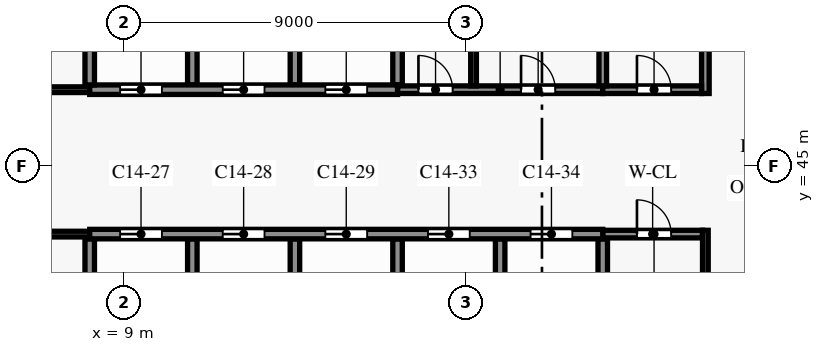
"""IFC4 building model, lengths in metres.
Left out: names, types, materials, properties, quantities, classifications, styles, units other than length and angle.
Written with IfcOpenShell. Run it as: python <this file> out.ifc"""

import sys

from ifc_helpers import new_model, si_unit, direction, frame, frame_2d, origin, place, context, subcontext, project, spatial, rectangle, extrude, element, fill, save


model = new_model("IFC4")
c1 = context("Model", 3, precision=1e-05, world=origin(), true_north=direction((0.0, 1.0)))
c2 = subcontext(c1, "Body", "Model", "MODEL_VIEW")
j1 = project(units=[si_unit("LENGTHUNIT", "METRE"), si_unit("PLANEANGLEUNIT", "RADIAN")], contexts=[c1])
p1 = place(None, origin())
s1 = spatial("IfcSite", under=j1, at=p1, CompositionType="ELEMENT")
p2 = place(p1, origin())
s2 = spatial("IfcBuilding", under=s1, at=p2, CompositionType="ELEMENT")
p3 = place(p2, frame((0.0, 0.0, 88.5)))
s3 = spatial("IfcBuildingStorey", under=s2, at=p3, CompositionType="ELEMENT", Elevation=88.5)
p4 = place(p3, frame((21.6, 43.2, 0.0), z_axis=(0.0, 0.0, 1.0), x_axis=(1.0, 0.0, 0.0)))
e1 = element("IfcWall", 1, at=p4, inside=s3, PredefinedType="PARTITIONING", context=c2, shape_type="SweptSolid", body=[
    extrude(rectangle(XDim=2.625, YDim=0.2, at=frame_2d((1.312, 0.0))), origin(), (0.0, 0.0, 1.0), 3.5),
])
p5 = place(p4, frame((0.9, 0.0, 0.0)))
e2 = element("IfcOpeningElement", 2, at=p5, cuts=e1, PredefinedType="OPENING", context=c2, shape_type="SweptSolid", body=[
    extrude(rectangle(XDim=0.9, YDim=2.1, at=frame_2d((0.45, 1.05))), frame((0.0, 0.11, 0.0), z_axis=(0.0, -1.0, 0.0), x_axis=(1.0, 0.0, 0.0)), (0.0, 0.0, 1.0), 0.22),
])
p6 = place(p3, frame((0.15, 43.2, 0.0), z_axis=(0.0, 0.0, 1.0), x_axis=(1.0, 0.0, 0.0)))
e3 = element("IfcWall", 3, at=p6, inside=s3, PredefinedType="PARTITIONING", context=c2, shape_type="SweptSolid", body=[
    extrude(rectangle(XDim=7.95, YDim=0.15, at=frame_2d((3.975, 0.0))), origin(), (0.0, 0.0, 1.0), 3.5),
])
p7 = place(p6, frame((0.725, 0.0, 0.0)))
e4 = element("IfcOpeningElement", 4, at=p7, cuts=e3, PredefinedType="OPENING", context=c2, shape_type="SweptSolid", body=[
    extrude(rectangle(XDim=0.9, YDim=2.1, at=frame_2d((0.45, 1.05))), frame((0.0, 0.085, 0.0), z_axis=(0.0, -1.0, 0.0), x_axis=(1.0, 0.0, 0.0)), (0.0, 0.0, 1.0), 0.17),
])
p8 = place(p6, frame((4.45, 0.0, 0.0)))
e5 = element("IfcOpeningElement", 5, at=p8, cuts=e3, PredefinedType="OPENING", context=c2, shape_type="SweptSolid", body=[
    extrude(rectangle(XDim=0.9, YDim=2.1, at=frame_2d((0.45, 1.05))), frame((0.0, 0.085, 0.0), z_axis=(0.0, -1.0, 0.0), x_axis=(1.0, 0.0, 0.0)), (0.0, 0.0, 1.0), 0.17),
])
p9 = place(p3, frame((8.1, 43.2, 0.0), z_axis=(0.0, 0.0, 1.0), x_axis=(1.0, 0.0, 0.0)))
e6 = element("IfcWall", 6, at=p9, inside=s3, PredefinedType="SHEAR", context=c2, shape_type="SweptSolid", body=[
    extrude(rectangle(XDim=13.5, YDim=0.25, at=frame_2d((6.75, 0.0))), origin(), (0.0, 0.0, 1.0), 3.5),
])
p10 = place(p9, frame((0.8, 0.0, 0.0)))
e7 = element("IfcOpeningElement", 7, at=p10, cuts=e6, PredefinedType="OPENING", context=c2, shape_type="SweptSolid", body=[
    extrude(rectangle(XDim=1.1, YDim=2.1, at=frame_2d((0.55, 1.05))), frame((0.0, 0.135, 0.0), z_axis=(0.0, -1.0, 0.0), x_axis=(1.0, 0.0, 0.0)), (0.0, 0.0, 1.0), 0.27),
])
p11 = place(p9, frame((3.5, 0.0, 0.0)))
e8 = element("IfcOpeningElement", 8, at=p11, cuts=e6, PredefinedType="OPENING", context=c2, shape_type="SweptSolid", body=[
    extrude(rectangle(XDim=1.1, YDim=2.1, at=frame_2d((0.55, 1.05))), frame((0.0, 0.135, 0.0), z_axis=(0.0, -1.0, 0.0), x_axis=(1.0, 0.0, 0.0)), (0.0, 0.0, 1.0), 0.27),
])
p12 = place(p9, frame((6.2, 0.0, 0.0)))
e9 = element("IfcOpeningElement", 9, at=p12, cuts=e6, PredefinedType="OPENING", context=c2, shape_type="SweptSolid", body=[
    extrude(rectangle(XDim=1.1, YDim=2.1, at=frame_2d((0.55, 1.05))), frame((0.0, 0.135, 0.0), z_axis=(0.0, -1.0, 0.0), x_axis=(1.0, 0.0, 0.0)), (0.0, 0.0, 1.0), 0.27),
])
p13 = place(p9, frame((8.9, 0.0, 0.0)))
e10 = element("IfcOpeningElement", 10, at=p13, cuts=e6, PredefinedType="OPENING", context=c2, shape_type="SweptSolid", body=[
    extrude(rectangle(XDim=1.1, YDim=2.1, at=frame_2d((0.55, 1.05))), frame((0.0, 0.135, 0.0), z_axis=(0.0, -1.0, 0.0), x_axis=(1.0, 0.0, 0.0)), (0.0, 0.0, 1.0), 0.27),
])
p14 = place(p9, frame((11.6, 0.0, 0.0)))
e11 = element("IfcOpeningElement", 11, at=p14, cuts=e6, PredefinedType="OPENING", context=c2, shape_type="SweptSolid", body=[
    extrude(rectangle(XDim=1.1, YDim=2.1, at=frame_2d((0.55, 1.05))), frame((0.0, 0.135, 0.0), z_axis=(0.0, -1.0, 0.0), x_axis=(1.0, 0.0, 0.0)), (0.0, 0.0, 1.0), 0.27),
])
p15 = place(p3, frame((16.2, 47.0, 0.0), z_axis=(0.0, 0.0, 1.0), x_axis=(1.0, 0.0, 0.0)))
e12 = element("IfcWall", 12, at=p15, inside=s3, PredefinedType="PARTITIONING", context=c2, shape_type="SweptSolid", body=[
    extrude(rectangle(XDim=5.4, YDim=0.2, at=frame_2d((2.7, 0.0))), origin(), (0.0, 0.0, 1.0), 3.5),
])
p16 = place(p15, frame((0.55, 0.0, 0.0)))
e13 = element("IfcOpeningElement", 13, at=p16, cuts=e12, PredefinedType="OPENING", context=c2, shape_type="SweptSolid", body=[
    extrude(rectangle(XDim=0.9, YDim=2.1, at=frame_2d((0.45, 1.05))), frame((0.0, 0.11, 0.0), z_axis=(0.0, -1.0, 0.0), x_axis=(1.0, 0.0, 0.0)), (0.0, 0.0, 1.0), 0.22),
])
p17 = place(p15, frame((3.25, 0.0, 0.0)))
e14 = element("IfcOpeningElement", 14, at=p17, cuts=e12, PredefinedType="OPENING", context=c2, shape_type="SweptSolid", body=[
    extrude(rectangle(XDim=0.9, YDim=2.1, at=frame_2d((0.45, 1.05))), frame((0.0, 0.11, 0.0), z_axis=(0.0, -1.0, 0.0), x_axis=(1.0, 0.0, 0.0)), (0.0, 0.0, 1.0), 0.22),
])
p18 = place(p3, frame((0.15, 47.0, 0.0), z_axis=(0.0, 0.0, 1.0), x_axis=(1.0, 0.0, 0.0)))
e15 = element("IfcWall", 15, at=p18, inside=s3, PredefinedType="PARTITIONING", context=c2, shape_type="SweptSolid", body=[
    extrude(rectangle(XDim=7.95, YDim=0.15, at=frame_2d((3.975, 0.0))), origin(), (0.0, 0.0, 1.0), 3.5),
])
p19 = place(p18, frame((0.725, 0.0, 0.0)))
e16 = element("IfcOpeningElement", 16, at=p19, cuts=e15, PredefinedType="OPENING", context=c2, shape_type="SweptSolid", body=[
    extrude(rectangle(XDim=0.9, YDim=2.1, at=frame_2d((0.45, 1.05))), frame((0.0, 0.085, 0.0), z_axis=(0.0, -1.0, 0.0), x_axis=(1.0, 0.0, 0.0)), (0.0, 0.0, 1.0), 0.17),
])
p20 = place(p18, frame((4.45, 0.0, 0.0)))
e17 = element("IfcOpeningElement", 17, at=p20, cuts=e15, PredefinedType="OPENING", context=c2, shape_type="SweptSolid", body=[
    extrude(rectangle(XDim=0.9, YDim=2.1, at=frame_2d((0.45, 1.05))), frame((0.0, 0.085, 0.0), z_axis=(0.0, -1.0, 0.0), x_axis=(1.0, 0.0, 0.0)), (0.0, 0.0, 1.0), 0.17),
])
p21 = place(p3, frame((21.6, 47.0, 0.0), z_axis=(0.0, 0.0, 1.0), x_axis=(1.0, 0.0, 0.0)))
e18 = element("IfcWall", 18, at=p21, inside=s3, PredefinedType="PARTITIONING", context=c2, shape_type="SweptSolid", body=[
    extrude(rectangle(XDim=2.6, YDim=0.2, at=frame_2d((1.3, 0.0))), origin(), (0.0, 0.0, 1.0), 3.5),
])
p22 = place(p21, frame((0.9, 0.0, 0.0)))
e19 = element("IfcOpeningElement", 19, at=p22, cuts=e18, PredefinedType="OPENING", context=c2, shape_type="SweptSolid", body=[
    extrude(rectangle(XDim=0.9, YDim=2.1, at=frame_2d((0.45, 1.05))), frame((0.0, 0.11, 0.0), z_axis=(0.0, -1.0, 0.0), x_axis=(1.0, 0.0, 0.0)), (0.0, 0.0, 1.0), 0.22),
])
p23 = place(p3, frame((8.1, 47.0, 0.0), z_axis=(0.0, 0.0, 1.0), x_axis=(1.0, 0.0, 0.0)))
e20 = element("IfcWall", 20, at=p23, inside=s3, PredefinedType="SHEAR", context=c2, shape_type="SweptSolid", body=[
    extrude(rectangle(XDim=8.1, YDim=0.25, at=frame_2d((4.05, 0.0))), origin(), (0.0, 0.0, 1.0), 3.5),
])
p24 = place(p23, frame((0.8, 0.0, 0.0)))
e21 = element("IfcOpeningElement", 21, at=p24, cuts=e20, PredefinedType="OPENING", context=c2, shape_type="SweptSolid", body=[
    extrude(rectangle(XDim=1.1, YDim=2.1, at=frame_2d((0.55, 1.05))), frame((0.0, 0.135, 0.0), z_axis=(0.0, -1.0, 0.0), x_axis=(1.0, 0.0, 0.0)), (0.0, 0.0, 1.0), 0.27),
])
p25 = place(p23, frame((3.5, 0.0, 0.0)))
e22 = element("IfcOpeningElement", 22, at=p25, cuts=e20, PredefinedType="OPENING", context=c2, shape_type="SweptSolid", body=[
    extrude(rectangle(XDim=1.1, YDim=2.1, at=frame_2d((0.55, 1.05))), frame((0.0, 0.135, 0.0), z_axis=(0.0, -1.0, 0.0), x_axis=(1.0, 0.0, 0.0)), (0.0, 0.0, 1.0), 0.27),
])
p26 = place(p23, frame((6.2, 0.0, 0.0)))
e23 = element("IfcOpeningElement", 23, at=p26, cuts=e20, PredefinedType="OPENING", context=c2, shape_type="SweptSolid", body=[
    extrude(rectangle(XDim=1.1, YDim=2.1, at=frame_2d((0.55, 1.05))), frame((0.0, 0.135, 0.0), z_axis=(0.0, -1.0, 0.0), x_axis=(1.0, 0.0, 0.0)), (0.0, 0.0, 1.0), 0.27),
])
for number, where, z_axis, x_axis in (
    (24, (8.1, 40.125, 0.0), (0.0, 0.0, 1.0), (0.0, 1.0, 0.0)),
    (25, (8.1, 47.125, 0.0), (0.0, 0.0, 1.0), (0.0, 1.0, 0.0)),
    (26, (10.8, 40.125, 0.0), (0.0, 0.0, 1.0), (0.0, 1.0, 0.0)),
    (27, (10.8, 47.125, 0.0), (0.0, 0.0, 1.0), (0.0, 1.0, 0.0)),
    (28, (13.5, 40.125, 0.0), (0.0, 0.0, 1.0), (0.0, 1.0, 0.0)),
    (29, (13.5, 47.125, 0.0), (0.0, 0.0, 1.0), (0.0, 1.0, 0.0)),
    (30, (16.2, 40.125, 0.0), (0.0, 0.0, 1.0), (0.0, 1.0, 0.0)),
):
    element("IfcWall", number, at=place(p3, frame(where, z_axis=z_axis, x_axis=x_axis)), inside=s3, PredefinedType="SHEAR", context=c2, shape_type="SweptSolid", body=[
        extrude(rectangle(XDim=2.95, YDim=0.25, at=frame_2d((1.475, 0.0))), origin(), (0.0, 0.0, 1.0), 3.5),
    ])
p27 = place(p3, frame((16.2, 47.125, 0.0), z_axis=(0.0, 0.0, 1.0), x_axis=(0.0, 1.0, 0.0)))
e31 = element("IfcWall", 31, at=p27, inside=s3, PredefinedType="SHEAR", context=c2, shape_type="SweptSolid", body=[
    extrude(rectangle(XDim=3.075, YDim=0.25, at=frame_2d((1.538, 0.0))), origin(), (0.0, 0.0, 1.0), 3.5),
])
p28 = place(p3, frame((18.2, 47.1, 0.0), z_axis=(0.0, 0.0, 1.0), x_axis=(0.0, 1.0, 0.0)))
e32 = element("IfcWall", 32, at=p28, inside=s3, PredefinedType="PARTITIONING", context=c2, shape_type="SweptSolid", body=[
    extrude(rectangle(XDim=4.625, YDim=0.15, at=frame_2d((2.312, 0.0))), origin(), (0.0, 0.0, 1.0), 3.5),
])
p29 = place(p3, frame((18.9, 40.125, 0.0), z_axis=(0.0, 0.0, 1.0), x_axis=(0.0, 1.0, 0.0)))
e33 = element("IfcWall", 33, at=p29, inside=s3, PredefinedType="SHEAR", context=c2, shape_type="SweptSolid", body=[
    extrude(rectangle(XDim=2.95, YDim=0.25, at=frame_2d((1.475, 0.0))), origin(), (0.0, 0.0, 1.0), 3.5),
])
p30 = place(p3, frame((21.6, 47.1, 0.0), z_axis=(0.0, 0.0, 1.0), x_axis=(0.0, 1.0, 0.0)))
e34 = element("IfcWall", 34, at=p30, inside=s3, PredefinedType="PARTITIONING", context=c2, shape_type="SweptSolid", body=[
    extrude(rectangle(XDim=4.6, YDim=0.2, at=frame_2d((2.3, 0.0))), origin(), (0.0, 0.0, 1.0), 3.5),
])
p31 = place(p3, frame((21.6, 40.125, 0.0), z_axis=(0.0, 0.0, 1.0), x_axis=(0.0, 1.0, 0.0)))
e35 = element("IfcWall", 35, at=p31, inside=s3, PredefinedType="SHEAR", context=c2, shape_type="SweptSolid", body=[
    extrude(rectangle(XDim=2.95, YDim=0.25, at=frame_2d((1.475, 0.0))), origin(), (0.0, 0.0, 1.0), 3.5),
])
p32 = place(p3, frame((24.3, 35.925, 0.0), z_axis=(0.0, 0.0, 1.0), x_axis=(0.0, 1.0, 0.0)))
e36 = element("IfcWall", 36, at=p32, inside=s3, PredefinedType="PARTITIONING", context=c2, shape_type="SweptSolid", body=[
    extrude(rectangle(XDim=7.375, YDim=0.15, at=frame_2d((3.688, 0.0))), origin(), (0.0, 0.0, 1.0), 3.5),
])
p33 = place(p3, frame((24.3, 46.9, 0.0), z_axis=(0.0, 0.0, 1.0), x_axis=(0.0, 1.0, 0.0)))
e37 = element("IfcWall", 37, at=p33, inside=s3, PredefinedType="SHEAR", context=c2, shape_type="SweptSolid", body=[
    extrude(rectangle(XDim=5.0, YDim=0.2, at=frame_2d((2.5, 0.0))), origin(), (0.0, 0.0, 1.0), 3.5),
])
p34 = place(p22, origin())
e38 = element("IfcDoor", 38, at=p34, inside=s3, OperationType="SINGLE_SWING_LEFT", PredefinedType="DOOR", context=c2, shape_type="SweptSolid", body=[
    extrude(rectangle(XDim=0.9, YDim=2.1, at=frame_2d((0.45, 1.05))), frame((0.0, 0.025, 0.0), z_axis=(0.0, -1.0, 0.0), x_axis=(1.0, 0.0, 0.0)), (0.0, 0.0, 1.0), 0.05),
])
fill(e19, e38)
p35 = place(p16, origin())
e39 = element("IfcDoor", 39, at=p35, inside=s3, OperationType="SINGLE_SWING_LEFT", PredefinedType="DOOR", context=c2, shape_type="SweptSolid", body=[
    extrude(rectangle(XDim=0.9, YDim=2.1, at=frame_2d((0.45, 1.05))), frame((0.0, 0.025, 0.0), z_axis=(0.0, -1.0, 0.0), x_axis=(1.0, 0.0, 0.0)), (0.0, 0.0, 1.0), 0.05),
])
fill(e13, e39)
p36 = place(p17, origin())
e40 = element("IfcDoor", 40, at=p36, inside=s3, OperationType="SINGLE_SWING_RIGHT", PredefinedType="DOOR", context=c2, shape_type="SweptSolid", body=[
    extrude(rectangle(XDim=0.9, YDim=2.1, at=frame_2d((0.45, 1.05))), frame((0.0, 0.025, 0.0), z_axis=(0.0, -1.0, 0.0), x_axis=(1.0, 0.0, 0.0)), (0.0, 0.0, 1.0), 0.05),
])
fill(e14, e40)
p37 = place(p5, origin())
e41 = element("IfcDoor", 41, at=p37, inside=s3, OperationType="SINGLE_SWING_RIGHT", PredefinedType="DOOR", context=c2, shape_type="SweptSolid", body=[
    extrude(rectangle(XDim=0.9, YDim=2.1, at=frame_2d((0.45, 1.05))), frame((0.0, 0.025, 0.0), z_axis=(0.0, -1.0, 0.0), x_axis=(1.0, 0.0, 0.0)), (0.0, 0.0, 1.0), 0.05),
])
fill(e2, e41)
p38 = place(p10, origin())
e42 = element("IfcDoor", 42, at=p38, inside=s3, OperationType="DOUBLE_DOOR_SLIDING", PredefinedType="DOOR", context=c2, shape_type="SweptSolid", body=[
    extrude(rectangle(XDim=1.1, YDim=2.1, at=frame_2d((0.55, 1.05))), frame((0.0, 0.025, 0.0), z_axis=(0.0, -1.0, 0.0), x_axis=(1.0, 0.0, 0.0)), (0.0, 0.0, 1.0), 0.05),
])
fill(e7, e42)
p39 = place(p11, origin())
e43 = element("IfcDoor", 43, at=p39, inside=s3, OperationType="DOUBLE_DOOR_SLIDING", PredefinedType="DOOR", context=c2, shape_type="SweptSolid", body=[
    extrude(rectangle(XDim=1.1, YDim=2.1, at=frame_2d((0.55, 1.05))), frame((0.0, 0.025, 0.0), z_axis=(0.0, -1.0, 0.0), x_axis=(1.0, 0.0, 0.0)), (0.0, 0.0, 1.0), 0.05),
])
fill(e8, e43)
p40 = place(p12, origin())
e44 = element("IfcDoor", 44, at=p40, inside=s3, OperationType="DOUBLE_DOOR_SLIDING", PredefinedType="DOOR", context=c2, shape_type="SweptSolid", body=[
    extrude(rectangle(XDim=1.1, YDim=2.1, at=frame_2d((0.55, 1.05))), frame((0.0, 0.025, 0.0), z_axis=(0.0, -1.0, 0.0), x_axis=(1.0, 0.0, 0.0)), (0.0, 0.0, 1.0), 0.05),
])
fill(e9, e44)
p41 = place(p24, origin())
e45 = element("IfcDoor", 45, at=p41, inside=s3, OperationType="DOUBLE_DOOR_SLIDING", PredefinedType="DOOR", context=c2, shape_type="SweptSolid", body=[
    extrude(rectangle(XDim=1.1, YDim=2.1, at=frame_2d((0.55, 1.05))), frame((0.0, 0.025, 0.0), z_axis=(0.0, -1.0, 0.0), x_axis=(1.0, 0.0, 0.0)), (0.0, 0.0, 1.0), 0.05),
])
fill(e21, e45)
p42 = place(p25, origin())
e46 = element("IfcDoor", 46, at=p42, inside=s3, OperationType="DOUBLE_DOOR_SLIDING", PredefinedType="DOOR", context=c2, shape_type="SweptSolid", body=[
    extrude(rectangle(XDim=1.1, YDim=2.1, at=frame_2d((0.55, 1.05))), frame((0.0, 0.025, 0.0), z_axis=(0.0, -1.0, 0.0), x_axis=(1.0, 0.0, 0.0)), (0.0, 0.0, 1.0), 0.05),
])
fill(e22, e46)
p43 = place(p26, origin())
e47 = element("IfcDoor", 47, at=p43, inside=s3, OperationType="DOUBLE_DOOR_SLIDING", PredefinedType="DOOR", context=c2, shape_type="SweptSolid", body=[
    extrude(rectangle(XDim=1.1, YDim=2.1, at=frame_2d((0.55, 1.05))), frame((0.0, 0.025, 0.0), z_axis=(0.0, -1.0, 0.0), x_axis=(1.0, 0.0, 0.0)), (0.0, 0.0, 1.0), 0.05),
])
fill(e23, e47)
p44 = place(p13, origin())
e48 = element("IfcDoor", 48, at=p44, inside=s3, OperationType="DOUBLE_DOOR_SLIDING", PredefinedType="DOOR", context=c2, shape_type="SweptSolid", body=[
    extrude(rectangle(XDim=1.1, YDim=2.1, at=frame_2d((0.55, 1.05))), frame((0.0, 0.025, 0.0), z_axis=(0.0, -1.0, 0.0), x_axis=(1.0, 0.0, 0.0)), (0.0, 0.0, 1.0), 0.05),
])
fill(e10, e48)
p45 = place(p14, origin())
e49 = element("IfcDoor", 49, at=p45, inside=s3, OperationType="DOUBLE_DOOR_SLIDING", PredefinedType="DOOR", context=c2, shape_type="SweptSolid", body=[
    extrude(rectangle(XDim=1.1, YDim=2.1, at=frame_2d((0.55, 1.05))), frame((0.0, 0.025, 0.0), z_axis=(0.0, -1.0, 0.0), x_axis=(1.0, 0.0, 0.0)), (0.0, 0.0, 1.0), 0.05),
])
fill(e11, e49)
save(model, sys.argv[1])
